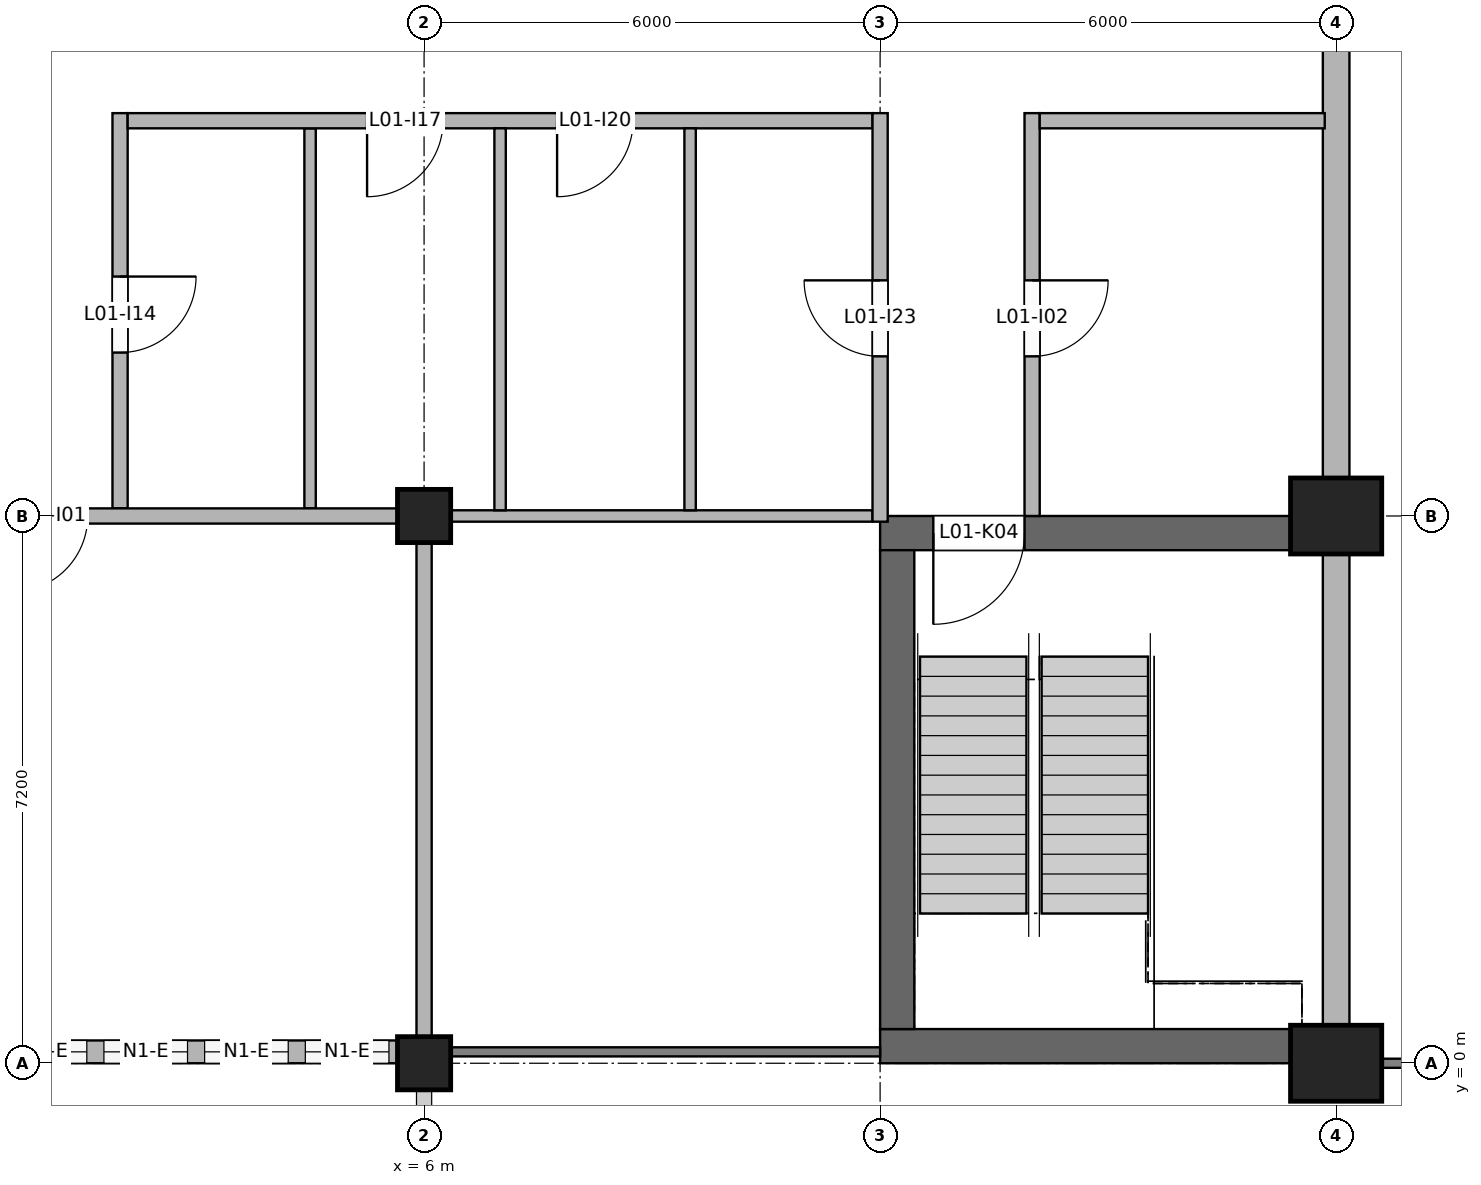
"""IFC4 building model, lengths in metres.
Left out: names, types, materials, properties, quantities, classifications, styles, units other than length and angle.
Written with IfcOpenShell. Run it as: python <this file> out.ifc"""

import sys

from ifc_helpers import new_model, si_unit, direction, frame, frame_2d, origin, origin_2d, place, context, subcontext, project, spatial, rectangle, extrude, element, fill, save


model = new_model("IFC4")
c1 = context("Model", 3, precision=1e-05, world=origin(), true_north=direction((0.0, 1.0)))
c2 = subcontext(c1, "Body", "Model", "MODEL_VIEW")
j1 = project(units=[si_unit("LENGTHUNIT", "METRE"), si_unit("PLANEANGLEUNIT", "RADIAN")], contexts=[c1])
p1 = place(None, origin())
s1 = spatial("IfcSite", under=j1, at=p1, CompositionType="ELEMENT")
p2 = place(p1, origin())
s2 = spatial("IfcBuilding", under=s1, at=p2, CompositionType="ELEMENT")
p3 = place(p2, frame((0.0, 0.0, 4.2)))
s3 = spatial("IfcBuildingStorey", under=s2, at=p3, CompositionType="ELEMENT", Elevation=4.2)
p4 = place(p3, frame((12.0, 0.225, 0.0), z_axis=(0.0, 0.0, 1.0), x_axis=(1.0, 0.0, 0.0)))
e1 = element("IfcWall", 1, at=p4, inside=s3, PredefinedType="SHEAR", context=c2, shape_type="SweptSolid", body=[
    extrude(rectangle(XDim=5.4, YDim=0.45, at=frame_2d((2.7, 0.0))), origin(), (0.0, 0.0, 1.0), 3.78),
])
p5 = place(p3, frame((12.0, 6.975, 0.0), z_axis=(0.0, 0.0, 1.0), x_axis=(1.0, 0.0, 0.0)))
e2 = element("IfcWall", 2, at=p5, inside=s3, PredefinedType="SHEAR", context=c2, shape_type="SweptSolid", body=[
    extrude(rectangle(XDim=5.4, YDim=0.45, at=frame_2d((2.7, 0.0))), origin(), (0.0, 0.0, 1.0), 3.78),
])
p6 = place(p5, frame((0.7, 0.0, 0.0)))
e3 = element("IfcOpeningElement", 3, at=p6, cuts=e2, PredefinedType="OPENING", context=c2, shape_type="SweptSolid", body=[
    extrude(rectangle(XDim=1.2, YDim=2.1, at=frame_2d((0.6, 1.05))), frame((0.0, 0.235, 0.0), z_axis=(0.0, -1.0, 0.0), x_axis=(1.0, 0.0, 0.0)), (0.0, 0.0, 1.0), 0.47),
])
p7 = place(p3, frame((12.225, 0.45, 0.0), z_axis=(0.0, 0.0, 1.0), x_axis=(0.0, 1.0, 0.0)))
e4 = element("IfcWall", 4, at=p7, inside=s3, PredefinedType="SHEAR", context=c2, shape_type="SweptSolid", body=[
    extrude(rectangle(XDim=6.3, YDim=0.45, at=frame_2d((3.15, 0.0))), origin(), (0.0, 0.0, 1.0), 3.78),
])
for number, where, z_axis, x_axis in (
    (5, (6.0, 0.0, 0.0), (0.0, 0.0, 1.0), (1.0, 0.0, 0.0)),
    (6, (6.0, 7.2, 0.0), (0.0, 0.0, 1.0), (1.0, 0.0, 0.0)),
):
    element("IfcColumn", number, at=place(p3, frame(where, z_axis=z_axis, x_axis=x_axis)), inside=s3, PredefinedType="COLUMN", context=c2, shape_type="SweptSolid", body=[
        extrude(rectangle(XDim=0.7, YDim=0.7, at=origin_2d()), origin(), (0.0, 0.0, 1.0), 3.95),
    ])
for number, where, z_axis, x_axis in (
    (7, (18.0, 0.0, 0.0), (0.0, 0.0, 1.0), (1.0, 0.0, 0.0)),
    (8, (18.0, 7.2, 0.0), (0.0, 0.0, 1.0), (1.0, 0.0, 0.0)),
):
    element("IfcColumn", number, at=place(p3, frame(where, z_axis=z_axis, x_axis=x_axis)), inside=s3, PredefinedType="COLUMN", context=c2, shape_type="SweptSolid", body=[
        extrude(rectangle(XDim=1.2, YDim=1.0, at=origin_2d()), origin(), (0.0, 0.0, 1.0), 4.091),
    ])
for number, where, z_axis, x_axis in (
    (9, (18.0, 0.5, 0.0), (0.0, 0.0, 1.0), (0.0, 1.0, 0.0)),
    (10, (18.0, 7.7, 0.0), (0.0, 0.0, 1.0), (0.0, 1.0, 0.0)),
):
    element("IfcWall", number, at=place(p3, frame(where, z_axis=z_axis, x_axis=x_axis)), inside=s3, PredefinedType="SOLIDWALL", context=c2, shape_type="SweptSolid", body=[
        extrude(rectangle(XDim=6.2, YDim=0.35, at=frame_2d((3.1, 0.0))), origin(), (0.0, 0.0, 1.0), 3.19),
    ])
p8 = place(p3, frame((0.35, 0.15, 0.0), z_axis=(0.0, 0.0, 1.0), x_axis=(1.0, 0.0, 0.0)))
e11 = element("IfcWall", 11, at=p8, inside=s3, PredefinedType="SOLIDWALL", context=c2, shape_type="SweptSolid", body=[
    extrude(rectangle(XDim=5.3, YDim=0.3, at=frame_2d((2.65, 0.0))), origin(), (0.0, 0.0, 1.0), 3.15),
])
p9 = place(p8, frame((0.113, 0.0, 0.9)))
e12 = element("IfcOpeningElement", 12, at=p9, cuts=e11, PredefinedType="OPENING", context=c2, shape_type="SweptSolid", body=[
    extrude(rectangle(XDim=1.1, YDim=1.5, at=frame_2d((0.55, 0.75))), frame((0.0, 0.16, 0.0), z_axis=(0.0, -1.0, 0.0), x_axis=(1.0, 0.0, 0.0)), (0.0, 0.0, 1.0), 0.32),
])
p10 = place(p8, frame((1.438, 0.0, 0.9)))
e13 = element("IfcOpeningElement", 13, at=p10, cuts=e11, PredefinedType="OPENING", context=c2, shape_type="SweptSolid", body=[
    extrude(rectangle(XDim=1.1, YDim=1.5, at=frame_2d((0.55, 0.75))), frame((0.0, 0.16, 0.0), z_axis=(0.0, -1.0, 0.0), x_axis=(1.0, 0.0, 0.0)), (0.0, 0.0, 1.0), 0.32),
])
p11 = place(p8, frame((2.762, 0.0, 0.9)))
e14 = element("IfcOpeningElement", 14, at=p11, cuts=e11, PredefinedType="OPENING", context=c2, shape_type="SweptSolid", body=[
    extrude(rectangle(XDim=1.1, YDim=1.5, at=frame_2d((0.55, 0.75))), frame((0.0, 0.16, 0.0), z_axis=(0.0, -1.0, 0.0), x_axis=(1.0, 0.0, 0.0)), (0.0, 0.0, 1.0), 0.32),
])
p12 = place(p8, frame((4.087, 0.0, 0.9)))
e15 = element("IfcOpeningElement", 15, at=p12, cuts=e11, PredefinedType="OPENING", context=c2, shape_type="SweptSolid", body=[
    extrude(rectangle(XDim=1.1, YDim=1.5, at=frame_2d((0.55, 0.75))), frame((0.0, 0.16, 0.0), z_axis=(0.0, -1.0, 0.0), x_axis=(1.0, 0.0, 0.0)), (0.0, 0.0, 1.0), 0.32),
])
p13 = place(p3, frame((2.0, 7.3, 0.0), z_axis=(0.0, 0.0, 1.0), x_axis=(0.0, 1.0, 0.0)))
e16 = element("IfcWall", 16, at=p13, inside=s3, PredefinedType="PARTITIONING", context=c2, shape_type="SweptSolid", body=[
    extrude(rectangle(XDim=5.2, YDim=0.2, at=frame_2d((2.6, 0.0))), origin(), (0.0, 0.0, 1.0), 3.15),
])
p14 = place(p13, frame((2.05, 0.0, 0.0)))
e17 = element("IfcOpeningElement", 17, at=p14, cuts=e16, PredefinedType="OPENING", context=c2, shape_type="SweptSolid", body=[
    extrude(rectangle(XDim=1.0, YDim=2.1, at=frame_2d((0.5, 1.05))), frame((0.0, 0.11, 0.0), z_axis=(0.0, -1.0, 0.0), x_axis=(1.0, 0.0, 0.0)), (0.0, 0.0, 1.0), 0.22),
])
p15 = place(p3, frame((4.5, 7.3, 0.0), z_axis=(0.0, 0.0, 1.0), x_axis=(0.0, 1.0, 0.0)))
e18 = element("IfcWall", 18, at=p15, inside=s3, PredefinedType="PARTITIONING", context=c2, shape_type="SweptSolid", body=[
    extrude(rectangle(XDim=5.0, YDim=0.15, at=frame_2d((2.5, 0.0))), origin(), (0.0, 0.0, 1.0), 3.15),
])
p16 = place(p3, frame((6.0, 0.15, 0.0), z_axis=(0.0, 0.0, 1.0), x_axis=(0.0, 1.0, 0.0)))
e19 = element("IfcWall", 19, at=p16, inside=s3, PredefinedType="PARTITIONING", context=c2, shape_type="SweptSolid", body=[
    extrude(rectangle(XDim=7.15, YDim=0.2, at=frame_2d((3.575, 0.0))), origin(), (0.0, 0.0, 1.0), 3.05),
])
for number, where, z_axis, x_axis in (
    (20, (7.0, 7.275, 0.0), (0.0, 0.0, 1.0), (0.0, 1.0, 0.0)),
    (21, (9.5, 7.275, 0.0), (0.0, 0.0, 1.0), (0.0, 1.0, 0.0)),
):
    element("IfcWall", number, at=place(p3, frame(where, z_axis=z_axis, x_axis=x_axis)), inside=s3, PredefinedType="PARTITIONING", context=c2, shape_type="SweptSolid", body=[
        extrude(rectangle(XDim=5.025, YDim=0.15, at=frame_2d((2.513, 0.0))), origin(), (0.0, 0.0, 1.0), 3.15),
    ])
p17 = place(p3, frame((12.0, 7.125, 0.0), z_axis=(0.0, 0.0, 1.0), x_axis=(0.0, 1.0, 0.0)))
e22 = element("IfcWall", 22, at=p17, inside=s3, PredefinedType="PARTITIONING", context=c2, shape_type="SweptSolid", body=[
    extrude(rectangle(XDim=5.375, YDim=0.2, at=frame_2d((2.688, 0.0))), origin(), (0.0, 0.0, 1.0), 3.05),
])
p18 = place(p17, frame((2.175, 0.0, 0.0)))
e23 = element("IfcOpeningElement", 23, at=p18, cuts=e22, PredefinedType="OPENING", context=c2, shape_type="SweptSolid", body=[
    extrude(rectangle(XDim=1.0, YDim=2.1, at=frame_2d((0.5, 1.05))), frame((0.0, 0.11, 0.0), z_axis=(0.0, -1.0, 0.0), x_axis=(1.0, 0.0, 0.0)), (0.0, 0.0, 1.0), 0.22),
])
p19 = place(p3, frame((14.0, 7.2, 0.0), z_axis=(0.0, 0.0, 1.0), x_axis=(0.0, 1.0, 0.0)))
e24 = element("IfcWall", 24, at=p19, inside=s3, PredefinedType="PARTITIONING", context=c2, shape_type="SweptSolid", body=[
    extrude(rectangle(XDim=5.3, YDim=0.2, at=frame_2d((2.65, 0.0))), origin(), (0.0, 0.0, 1.0), 3.95),
])
p20 = place(p19, frame((2.1, 0.0, 0.0)))
e25 = element("IfcOpeningElement", 25, at=p20, cuts=e24, PredefinedType="OPENING", context=c2, shape_type="SweptSolid", body=[
    extrude(rectangle(XDim=1.0, YDim=2.1, at=frame_2d((0.5, 1.05))), frame((0.0, 0.11, 0.0), z_axis=(0.0, -1.0, 0.0), x_axis=(1.0, 0.0, 0.0)), (0.0, 0.0, 1.0), 0.22),
])
p21 = place(p3, frame((0.15, 7.2, 0.0), z_axis=(0.0, 0.0, 1.0), x_axis=(1.0, 0.0, 0.0)))
e26 = element("IfcWall", 26, at=p21, inside=s3, PredefinedType="PARTITIONING", context=c2, shape_type="SweptSolid", body=[
    extrude(rectangle(XDim=5.75, YDim=0.2, at=frame_2d((2.875, 0.0))), origin(), (0.0, 0.0, 1.0), 3.15),
])
p22 = place(p21, frame((0.425, 0.0, 0.0)))
e27 = element("IfcOpeningElement", 27, at=p22, cuts=e26, PredefinedType="OPENING", context=c2, shape_type="SweptSolid", body=[
    extrude(rectangle(XDim=1.0, YDim=2.1, at=frame_2d((0.5, 1.05))), frame((0.0, 0.11, 0.0), z_axis=(0.0, -1.0, 0.0), x_axis=(1.0, 0.0, 0.0)), (0.0, 0.0, 1.0), 0.22),
])
p23 = place(p3, frame((6.35, 7.2, 0.0), z_axis=(0.0, 0.0, 1.0), x_axis=(1.0, 0.0, 0.0)))
e28 = element("IfcWall", 28, at=p23, inside=s3, PredefinedType="PARTITIONING", context=c2, shape_type="SweptSolid", body=[
    extrude(rectangle(XDim=5.55, YDim=0.15, at=frame_2d((2.775, 0.0))), origin(), (0.0, 0.0, 1.0), 3.05),
])
p24 = place(p3, frame((2.1, 12.4, 0.0), z_axis=(0.0, 0.0, 1.0), x_axis=(1.0, 0.0, 0.0)))
e29 = element("IfcWall", 29, at=p24, inside=s3, PredefinedType="PARTITIONING", context=c2, shape_type="SweptSolid", body=[
    extrude(rectangle(XDim=9.8, YDim=0.2, at=frame_2d((4.9, 0.0))), origin(), (0.0, 0.0, 1.0), 3.05),
])
p25 = place(p24, frame((3.15, 0.0, 0.0)))
e30 = element("IfcOpeningElement", 30, at=p25, cuts=e29, PredefinedType="OPENING", context=c2, shape_type="SweptSolid", body=[
    extrude(rectangle(XDim=1.0, YDim=2.1, at=frame_2d((0.5, 1.05))), frame((0.0, 0.11, 0.0), z_axis=(0.0, -1.0, 0.0), x_axis=(1.0, 0.0, 0.0)), (0.0, 0.0, 1.0), 0.22),
])
p26 = place(p24, frame((5.65, 0.0, 0.0)))
e31 = element("IfcOpeningElement", 31, at=p26, cuts=e29, PredefinedType="OPENING", context=c2, shape_type="SweptSolid", body=[
    extrude(rectangle(XDim=1.0, YDim=2.1, at=frame_2d((0.5, 1.05))), frame((0.0, 0.11, 0.0), z_axis=(0.0, -1.0, 0.0), x_axis=(1.0, 0.0, 0.0)), (0.0, 0.0, 1.0), 0.22),
])
p27 = place(p3, frame((14.1, 12.4, 0.0), z_axis=(0.0, 0.0, 1.0), x_axis=(1.0, 0.0, 0.0)))
e32 = element("IfcWall", 32, at=p27, inside=s3, PredefinedType="PARTITIONING", context=c2, shape_type="SweptSolid", body=[
    extrude(rectangle(XDim=3.75, YDim=0.2, at=frame_2d((1.875, 0.0))), origin(), (0.0, 0.0, 1.0), 3.05),
])
p28 = place(p9, origin())
e33 = element("IfcWindow", 33, at=p28, inside=s3, PartitioningType="SINGLE_PANEL", PredefinedType="WINDOW", context=c2, shape_type="SweptSolid", body=[
    extrude(rectangle(XDim=1.1, YDim=1.5, at=frame_2d((0.55, 0.75))), frame((0.0, 0.03, 0.0), z_axis=(0.0, -1.0, 0.0), x_axis=(1.0, 0.0, 0.0)), (0.0, 0.0, 1.0), 0.06),
])
fill(e12, e33)
p29 = place(p10, origin())
e34 = element("IfcWindow", 34, at=p29, inside=s3, PartitioningType="SINGLE_PANEL", PredefinedType="WINDOW", context=c2, shape_type="SweptSolid", body=[
    extrude(rectangle(XDim=1.1, YDim=1.5, at=frame_2d((0.55, 0.75))), frame((0.0, 0.03, 0.0), z_axis=(0.0, -1.0, 0.0), x_axis=(1.0, 0.0, 0.0)), (0.0, 0.0, 1.0), 0.06),
])
fill(e13, e34)
p30 = place(p11, origin())
e35 = element("IfcWindow", 35, at=p30, inside=s3, PartitioningType="SINGLE_PANEL", PredefinedType="WINDOW", context=c2, shape_type="SweptSolid", body=[
    extrude(rectangle(XDim=1.1, YDim=1.5, at=frame_2d((0.55, 0.75))), frame((0.0, 0.03, 0.0), z_axis=(0.0, -1.0, 0.0), x_axis=(1.0, 0.0, 0.0)), (0.0, 0.0, 1.0), 0.06),
])
fill(e14, e35)
p31 = place(p12, origin())
e36 = element("IfcWindow", 36, at=p31, inside=s3, PartitioningType="SINGLE_PANEL", PredefinedType="WINDOW", context=c2, shape_type="SweptSolid", body=[
    extrude(rectangle(XDim=1.1, YDim=1.5, at=frame_2d((0.55, 0.75))), frame((0.0, 0.03, 0.0), z_axis=(0.0, -1.0, 0.0), x_axis=(1.0, 0.0, 0.0)), (0.0, 0.0, 1.0), 0.06),
])
fill(e15, e36)
p32 = place(p6, frame((1.2, 0.0, 0.0), z_axis=(0.0, 0.0, 1.0), x_axis=(-1.0, 0.0, 0.0)))
e37 = element("IfcDoor", 37, at=p32, inside=s3, OperationType="SINGLE_SWING_RIGHT", PredefinedType="DOOR", context=c2, shape_type="SweptSolid", body=[
    extrude(rectangle(XDim=1.2, YDim=2.1, at=frame_2d((0.6, 1.05))), frame((0.0, 0.025, 0.0), z_axis=(0.0, -1.0, 0.0), x_axis=(1.0, 0.0, 0.0)), (0.0, 0.0, 1.0), 0.05),
])
fill(e3, e37)
p33 = place(p22, frame((1.0, 0.0, 0.0), z_axis=(0.0, 0.0, 1.0), x_axis=(-1.0, 0.0, 0.0)))
e38 = element("IfcDoor", 38, at=p33, inside=s3, OperationType="SINGLE_SWING_RIGHT", PredefinedType="DOOR", context=c2, shape_type="SweptSolid", body=[
    extrude(rectangle(XDim=1.0, YDim=2.1, at=frame_2d((0.5, 1.05))), frame((0.0, 0.025, 0.0), z_axis=(0.0, -1.0, 0.0), x_axis=(1.0, 0.0, 0.0)), (0.0, 0.0, 1.0), 0.05),
])
fill(e27, e38)
p34 = place(p20, frame((1.0, 0.0, 0.0), z_axis=(0.0, 0.0, 1.0), x_axis=(-1.0, 0.0, 0.0)))
e39 = element("IfcDoor", 39, at=p34, inside=s3, OperationType="SINGLE_SWING_LEFT", PredefinedType="DOOR", context=c2, shape_type="SweptSolid", body=[
    extrude(rectangle(XDim=1.0, YDim=2.1, at=frame_2d((0.5, 1.05))), frame((0.0, 0.025, 0.0), z_axis=(0.0, -1.0, 0.0), x_axis=(1.0, 0.0, 0.0)), (0.0, 0.0, 1.0), 0.05),
])
fill(e25, e39)
p35 = place(p14, frame((1.0, 0.0, 0.0), z_axis=(0.0, 0.0, 1.0), x_axis=(-1.0, 0.0, 0.0)))
e40 = element("IfcDoor", 40, at=p35, inside=s3, OperationType="SINGLE_SWING_LEFT", PredefinedType="DOOR", context=c2, shape_type="SweptSolid", body=[
    extrude(rectangle(XDim=1.0, YDim=2.1, at=frame_2d((0.5, 1.05))), frame((0.0, 0.025, 0.0), z_axis=(0.0, -1.0, 0.0), x_axis=(1.0, 0.0, 0.0)), (0.0, 0.0, 1.0), 0.05),
])
fill(e17, e40)
p36 = place(p25, frame((1.0, 0.0, 0.0), z_axis=(0.0, 0.0, 1.0), x_axis=(-1.0, 0.0, 0.0)))
e41 = element("IfcDoor", 41, at=p36, inside=s3, OperationType="SINGLE_SWING_RIGHT", PredefinedType="DOOR", context=c2, shape_type="SweptSolid", body=[
    extrude(rectangle(XDim=1.0, YDim=2.1, at=frame_2d((0.5, 1.05))), frame((0.0, 0.025, 0.0), z_axis=(0.0, -1.0, 0.0), x_axis=(1.0, 0.0, 0.0)), (0.0, 0.0, 1.0), 0.05),
])
fill(e30, e41)
p37 = place(p26, frame((1.0, 0.0, 0.0), z_axis=(0.0, 0.0, 1.0), x_axis=(-1.0, 0.0, 0.0)))
e42 = element("IfcDoor", 42, at=p37, inside=s3, OperationType="SINGLE_SWING_RIGHT", PredefinedType="DOOR", context=c2, shape_type="SweptSolid", body=[
    extrude(rectangle(XDim=1.0, YDim=2.1, at=frame_2d((0.5, 1.05))), frame((0.0, 0.025, 0.0), z_axis=(0.0, -1.0, 0.0), x_axis=(1.0, 0.0, 0.0)), (0.0, 0.0, 1.0), 0.05),
])
fill(e31, e42)
p38 = place(p18, origin())
e43 = element("IfcDoor", 43, at=p38, inside=s3, OperationType="SINGLE_SWING_RIGHT", PredefinedType="DOOR", context=c2, shape_type="SweptSolid", body=[
    extrude(rectangle(XDim=1.0, YDim=2.1, at=frame_2d((0.5, 1.05))), frame((0.0, 0.025, 0.0), z_axis=(0.0, -1.0, 0.0), x_axis=(1.0, 0.0, 0.0)), (0.0, 0.0, 1.0), 0.05),
])
fill(e23, e43)
save(model, sys.argv[1])
